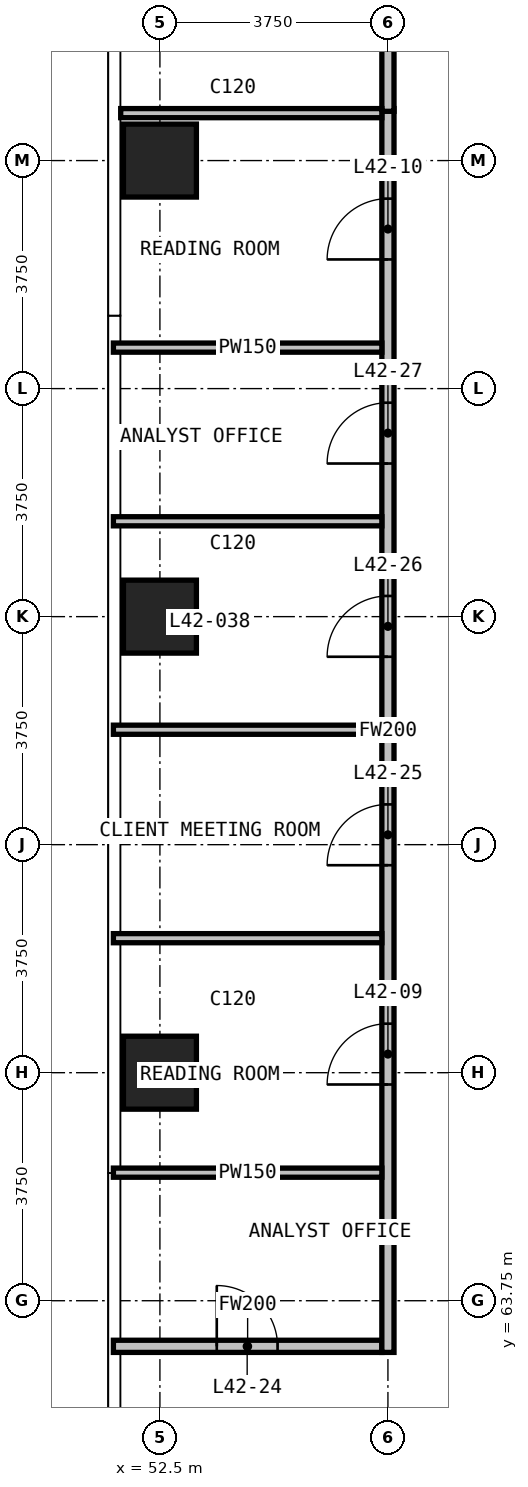
"""IFC4 building model, lengths in metres.
Left out: names, types, materials, properties, quantities, classifications, styles, units other than length and angle.
Written with IfcOpenShell. Run it as: python <this file> out.ifc"""

import sys

from ifc_helpers import new_model, si_unit, direction, frame, frame_2d, origin, origin_2d, place, context, subcontext, project, spatial, rectangle, extrude, element, fill, save


model = new_model("IFC4")
c1 = context("Model", 3, precision=1e-05, world=origin(), true_north=direction((0.0, 1.0)))
c2 = subcontext(c1, "Body", "Model", "MODEL_VIEW")
j1 = project(units=[si_unit("LENGTHUNIT", "METRE"), si_unit("PLANEANGLEUNIT", "RADIAN")], contexts=[c1])
p1 = place(None, origin())
s1 = spatial("IfcSite", under=j1, at=p1, CompositionType="ELEMENT")
p2 = place(p1, origin())
s2 = spatial("IfcBuilding", under=s1, at=p2, CompositionType="ELEMENT")
p3 = place(p2, frame((0.0, 0.0, 165.7)))
s3 = spatial("IfcBuildingStorey", under=s2, at=p3, CompositionType="ELEMENT", Elevation=165.7)
for number, where, z_axis, x_axis in (
    (1, (52.5, 67.5, 0.0), (0.0, 0.0, 1.0), (1.0, 0.0, 0.0)),
    (2, (52.5, 75.0, 0.0), (0.0, 0.0, 1.0), (1.0, 0.0, 0.0)),
    (3, (52.5, 82.5, 0.0), (0.0, 0.0, 1.0), (1.0, 0.0, 0.0)),
):
    element("IfcColumn", number, at=place(p3, frame(where, z_axis=z_axis, x_axis=x_axis)), inside=s3, PredefinedType="COLUMN", context=c2, shape_type="SweptSolid", body=[
        extrude(rectangle(XDim=1.2, YDim=1.2, at=origin_2d()), origin(), (0.0, 0.0, 1.0), 3.6),
    ])
p4 = place(p3, frame((51.735, 63.0, 0.0), z_axis=(0.0, 0.0, 1.0), x_axis=(1.0, 0.0, 0.0)))
e4 = element("IfcWall", 4, at=p4, inside=s3, PredefinedType="PARTITIONING", context=c2, shape_type="SweptSolid", body=[
    extrude(rectangle(XDim=4.415, YDim=0.2, at=frame_2d((2.208, 0.0))), origin(), (0.0, 0.0, 1.0), 3.3),
])
p5 = place(p4, frame((1.7, 0.0, 0.0)))
e5 = element("IfcOpeningElement", 5, at=p5, cuts=e4, PredefinedType="OPENING", context=c2, shape_type="SweptSolid", body=[
    extrude(rectangle(XDim=1.0, YDim=2.2, at=frame_2d((0.5, 1.1))), frame((0.0, 0.11, 0.0), z_axis=(0.0, -1.0, 0.0), x_axis=(1.0, 0.0, 0.0)), (0.0, 0.0, 1.0), 0.22),
])
p6 = place(p3, frame((56.25, 62.9, 0.0), z_axis=(0.0, 0.0, 1.0), x_axis=(0.0, 1.0, 0.0)))
e6 = element("IfcWall", 6, at=p6, inside=s3, PredefinedType="PARTITIONING", context=c2, shape_type="SweptSolid", body=[
    extrude(rectangle(XDim=20.455, YDim=0.2, at=frame_2d((10.228, 0.0))), origin(), (0.0, 0.0, 1.0), 3.3),
])
p7 = place(p6, frame((4.406, 0.0, 0.0)))
e7 = element("IfcOpeningElement", 7, at=p7, cuts=e6, PredefinedType="OPENING", context=c2, shape_type="SweptSolid", body=[
    extrude(rectangle(XDim=1.0, YDim=2.2, at=frame_2d((0.5, 1.1))), frame((0.0, 0.11, 0.0), z_axis=(0.0, -1.0, 0.0), x_axis=(1.0, 0.0, 0.0)), (0.0, 0.0, 1.0), 0.22),
])
p8 = place(p6, frame((17.974, 0.0, 0.0)))
e8 = element("IfcOpeningElement", 8, at=p8, cuts=e6, PredefinedType="OPENING", context=c2, shape_type="SweptSolid", body=[
    extrude(rectangle(XDim=1.0, YDim=2.2, at=frame_2d((0.5, 1.1))), frame((0.0, 0.11, 0.0), z_axis=(0.0, -1.0, 0.0), x_axis=(1.0, 0.0, 0.0)), (0.0, 0.0, 1.0), 0.22),
])
p9 = place(p6, frame((8.012, 0.0, 0.0)))
e9 = element("IfcOpeningElement", 9, at=p9, cuts=e6, PredefinedType="OPENING", context=c2, shape_type="SweptSolid", body=[
    extrude(rectangle(XDim=1.0, YDim=2.2, at=frame_2d((0.5, 1.1))), frame((0.0, 0.11, 0.0), z_axis=(0.0, -1.0, 0.0), x_axis=(1.0, 0.0, 0.0)), (0.0, 0.0, 1.0), 0.22),
])
p10 = place(p6, frame((11.44, 0.0, 0.0)))
e10 = element("IfcOpeningElement", 10, at=p10, cuts=e6, PredefinedType="OPENING", context=c2, shape_type="SweptSolid", body=[
    extrude(rectangle(XDim=1.0, YDim=2.2, at=frame_2d((0.5, 1.1))), frame((0.0, 0.11, 0.0), z_axis=(0.0, -1.0, 0.0), x_axis=(1.0, 0.0, 0.0)), (0.0, 0.0, 1.0), 0.22),
])
p11 = place(p6, frame((14.618, 0.0, 0.0)))
e11 = element("IfcOpeningElement", 11, at=p11, cuts=e6, PredefinedType="OPENING", context=c2, shape_type="SweptSolid", body=[
    extrude(rectangle(XDim=1.0, YDim=2.2, at=frame_2d((0.5, 1.1))), frame((0.0, 0.11, 0.0), z_axis=(0.0, -1.0, 0.0), x_axis=(1.0, 0.0, 0.0)), (0.0, 0.0, 1.0), 0.22),
])
p12 = place(p3, frame((56.25, 83.31, 0.0), z_axis=(0.0, 0.0, 1.0), x_axis=(0.0, 1.0, 0.0)))
e12 = element("IfcWall", 12, at=p12, inside=s3, PredefinedType="PARTITIONING", context=c2, shape_type="SweptSolid", body=[
    extrude(rectangle(XDim=7.335, YDim=0.2, at=frame_2d((3.667, 0.0))), origin(), (0.0, 0.0, 1.0), 3.3),
])
for number, where, z_axis, x_axis in (
    (13, (51.735, 65.856, 0.0), (0.0, 0.0, 1.0), (1.0, 0.0, 0.0)),
    (14, (51.735, 69.712, 0.0), (0.0, 0.0, 1.0), (1.0, 0.0, 0.0)),
    (15, (51.735, 73.14, 0.0), (0.0, 0.0, 1.0), (1.0, 0.0, 0.0)),
    (16, (51.735, 76.568, 0.0), (0.0, 0.0, 1.0), (1.0, 0.0, 0.0)),
    (17, (51.735, 79.424, 0.0), (0.0, 0.0, 1.0), (1.0, 0.0, 0.0)),
):
    element("IfcWall", number, at=place(p3, frame(where, z_axis=z_axis, x_axis=x_axis)), inside=s3, PredefinedType="PARTITIONING", context=c2, shape_type="SweptSolid", body=[
        extrude(rectangle(XDim=4.415, YDim=0.15, at=frame_2d((2.208, 0.0))), origin(), (0.0, 0.0, 1.0), 3.3),
    ])
p13 = place(p3, frame((51.855, 83.28, 0.0), z_axis=(0.0, 0.0, 1.0), x_axis=(1.0, 0.0, 0.0)))
e18 = element("IfcWall", 18, at=p13, inside=s3, PredefinedType="PARTITIONING", context=c2, shape_type="SweptSolid", body=[
    extrude(rectangle(XDim=4.295, YDim=0.15, at=frame_2d((2.147, 0.0))), origin(), (0.0, 0.0, 1.0), 3.3),
])
p14 = place(p7, origin())
e19 = element("IfcDoor", 19, at=p14, inside=s3, OperationType="SINGLE_SWING_LEFT", PredefinedType="DOOR", context=c2, shape_type="SweptSolid", body=[
    extrude(rectangle(XDim=1.0, YDim=2.2, at=frame_2d((0.5, 1.1))), frame((0.0, 0.025, 0.0), z_axis=(0.0, -1.0, 0.0), x_axis=(1.0, 0.0, 0.0)), (0.0, 0.0, 1.0), 0.05),
])
fill(e7, e19)
p15 = place(p8, origin())
e20 = element("IfcDoor", 20, at=p15, inside=s3, OperationType="SINGLE_SWING_LEFT", PredefinedType="DOOR", context=c2, shape_type="SweptSolid", body=[
    extrude(rectangle(XDim=1.0, YDim=2.2, at=frame_2d((0.5, 1.1))), frame((0.0, 0.025, 0.0), z_axis=(0.0, -1.0, 0.0), x_axis=(1.0, 0.0, 0.0)), (0.0, 0.0, 1.0), 0.05),
])
fill(e8, e20)
p16 = place(p5, origin())
e21 = element("IfcDoor", 21, at=p16, inside=s3, OperationType="SINGLE_SWING_LEFT", PredefinedType="DOOR", context=c2, shape_type="SweptSolid", body=[
    extrude(rectangle(XDim=1.0, YDim=2.2, at=frame_2d((0.5, 1.1))), frame((0.0, 0.025, 0.0), z_axis=(0.0, -1.0, 0.0), x_axis=(1.0, 0.0, 0.0)), (0.0, 0.0, 1.0), 0.05),
])
fill(e5, e21)
p17 = place(p9, origin())
e22 = element("IfcDoor", 22, at=p17, inside=s3, OperationType="SINGLE_SWING_LEFT", PredefinedType="DOOR", context=c2, shape_type="SweptSolid", body=[
    extrude(rectangle(XDim=1.0, YDim=2.2, at=frame_2d((0.5, 1.1))), frame((0.0, 0.025, 0.0), z_axis=(0.0, -1.0, 0.0), x_axis=(1.0, 0.0, 0.0)), (0.0, 0.0, 1.0), 0.05),
])
fill(e9, e22)
p18 = place(p10, origin())
e23 = element("IfcDoor", 23, at=p18, inside=s3, OperationType="SINGLE_SWING_RIGHT", PredefinedType="DOOR", context=c2, shape_type="SweptSolid", body=[
    extrude(rectangle(XDim=1.0, YDim=2.2, at=frame_2d((0.5, 1.1))), frame((0.0, 0.025, 0.0), z_axis=(0.0, -1.0, 0.0), x_axis=(1.0, 0.0, 0.0)), (0.0, 0.0, 1.0), 0.05),
])
fill(e10, e23)
p19 = place(p11, origin())
e24 = element("IfcDoor", 24, at=p19, inside=s3, OperationType="SINGLE_SWING_LEFT", PredefinedType="DOOR", context=c2, shape_type="SweptSolid", body=[
    extrude(rectangle(XDim=1.0, YDim=2.2, at=frame_2d((0.5, 1.1))), frame((0.0, 0.025, 0.0), z_axis=(0.0, -1.0, 0.0), x_axis=(1.0, 0.0, 0.0)), (0.0, 0.0, 1.0), 0.05),
])
fill(e11, e24)
save(model, sys.argv[1])
